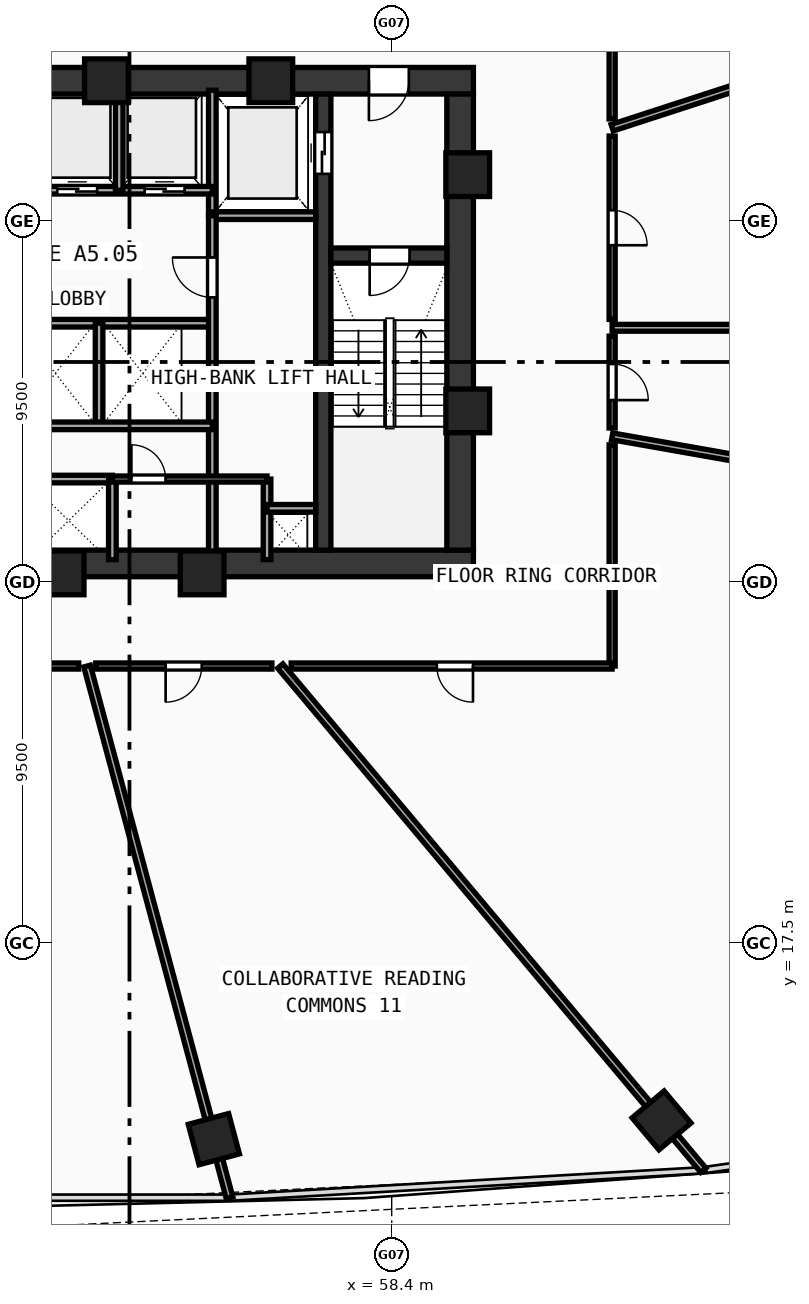
"""IFC4 building model, lengths in metres.
Left out: names, types, materials, properties, quantities, classifications, styles, units other than length and angle.
Written with IfcOpenShell. Run it as: python <this file> out.ifc"""

import sys

from ifc_helpers import new_model, si_unit, direction, frame, frame_2d, origin, origin_with_axes, origin_2d, place, context, subcontext, project, spatial, rectangle, hollow_rectangle, extrude, source, transform, mapped, element, fill, save


model = new_model("IFC4")
c1 = context("Model", 3, precision=1e-05, world=origin(), true_north=direction((0.0, 1.0)))
c2 = subcontext(c1, "Body", "Model", "MODEL_VIEW")
j1 = project(units=[si_unit("LENGTHUNIT", "METRE"), si_unit("PLANEANGLEUNIT", "RADIAN")], contexts=[c1])
p1 = place(None, origin())
s1 = spatial("IfcSite", under=j1, at=p1, CompositionType="ELEMENT")
p2 = place(p1, origin())
s2 = spatial("IfcBuilding", under=s1, at=p2, CompositionType="ELEMENT")
p3 = place(p2, frame((0.0, 0.0, 48.55)))
s3 = spatial("IfcBuildingStorey", under=s2, at=p3, CompositionType="ELEMENT", Elevation=48.55)
p4 = place(p3, frame((35.45, 27.5, 0.0), z_axis=(0.0, 0.0, 1.0), x_axis=(1.0, 0.0, 0.0)))
e1 = element("IfcWall", 1, at=p4, inside=s3, PredefinedType="SHEAR", context=c2, shape_type="SweptSolid", body=[
    extrude(rectangle(XDim=25.1, YDim=0.7, at=frame_2d((12.55, 0.0))), origin(), (0.0, 0.0, 1.0), 3.37),
])
p5 = place(p3, frame((49.2, 40.2, 0.0), z_axis=(0.0, 0.0, 1.0), x_axis=(1.0, 0.0, 0.0)))
e2 = element("IfcWall", 2, at=p5, inside=s3, PredefinedType="SHEAR", context=c2, shape_type="SweptSolid", body=[
    extrude(rectangle(XDim=11.35, YDim=0.7, at=frame_2d((5.675, 0.0))), origin(), (0.0, 0.0, 1.0), 3.37),
])
p6 = place(p5, frame((8.6, 0.0, 0.0)))
e3 = element("IfcOpeningElement", 3, at=p6, cuts=e2, PredefinedType="OPENING", context=c2, shape_type="SweptSolid", body=[
    extrude(rectangle(XDim=1.05, YDim=2.1, at=frame_2d((0.525, 1.05))), frame((0.0, 0.36, 0.0), z_axis=(0.0, -1.0, 0.0), x_axis=(1.0, 0.0, 0.0)), (0.0, 0.0, 1.0), 0.72),
])
p7 = place(p3, frame((60.2, 27.85, 0.0), z_axis=(0.0, 0.0, 1.0), x_axis=(0.0, 1.0, 0.0)))
e4 = element("IfcWall", 4, at=p7, inside=s3, PredefinedType="SHEAR", context=c2, shape_type="SweptSolid", body=[
    extrude(rectangle(XDim=12.0, YDim=0.7, at=frame_2d((6.0, 0.0))), origin(), (0.0, 0.0, 1.0), 3.37),
])
p8 = place(p3, frame((56.6, 27.85, 0.0), z_axis=(0.0, 0.0, 1.0), x_axis=(0.0, 1.0, 0.0)))
e5 = element("IfcWall", 5, at=p8, inside=s3, PredefinedType="SHEAR", context=c2, shape_type="SweptSolid", body=[
    extrude(rectangle(XDim=12.0, YDim=0.4, at=frame_2d((6.0, 0.0))), origin(), (0.0, 0.0, 1.0), 3.37),
])
p9 = place(p8, frame((9.9, 0.0, 0.0)))
e6 = element("IfcOpeningElement", 6, at=p9, cuts=e5, PredefinedType="OPENING", context=c2, shape_type="SweptSolid", body=[
    extrude(rectangle(XDim=1.1, YDim=2.1, at=frame_2d((0.55, 1.05))), frame((0.0, 0.21, 0.0), z_axis=(0.0, -1.0, 0.0), x_axis=(1.0, 0.0, 0.0)), (0.0, 0.0, 1.0), 0.42),
])
p10 = place(p3, frame((56.8, 35.6, 0.0), z_axis=(0.0, 0.0, 1.0), x_axis=(1.0, 0.0, 0.0)))
e7 = element("IfcWall", 7, at=p10, inside=s3, PredefinedType="SHEAR", context=c2, shape_type="SweptSolid", body=[
    extrude(rectangle(XDim=3.05, YDim=0.4, at=frame_2d((1.525, 0.0))), origin(), (0.0, 0.0, 1.0), 3.37),
])
p11 = place(p10, frame((1.02, 0.0, 0.0)))
e8 = element("IfcOpeningElement", 8, at=p11, cuts=e7, PredefinedType="OPENING", context=c2, shape_type="SweptSolid", body=[
    extrude(rectangle(XDim=1.05, YDim=2.1, at=frame_2d((0.525, 1.05))), frame((0.0, 0.21, 0.0), z_axis=(0.0, -1.0, 0.0), x_axis=(1.0, 0.0, 0.0)), (0.0, 0.0, 1.0), 0.42),
])
m1 = source(origin(), c2, "Body", "SweptSolid", [
    extrude(hollow_rectangle(XDim=1.15, YDim=1.15, WallThickness=0.048, at=origin_2d()), origin(), (0.0, 0.0, 1.0), 3.63),
])
for number, where, z_axis, x_axis in (
    (9, (49.729, 27.25, -0.26), (0.0, 0.0, 1.0), (1.0, 0.0, 0.0)),
    (10, (53.412, 27.25, -0.26), (0.0, 0.0, 1.0), (1.0, 0.0, 0.0)),
    (11, (60.4, 31.513, -0.26), (0.0, 0.0, 1.0), (1.0, 0.0, 0.0)),
    (12, (60.4, 37.729, -0.26), (0.0, 0.0, 1.0), (1.0, 0.0, 0.0)),
    (13, (55.219, 40.2, -0.26), (0.0, 0.0, 1.0), (1.0, 0.0, 0.0)),
    (14, (50.894, 40.2, -0.26), (0.0, 0.0, 1.0), (1.0, 0.0, 0.0)),
):
    element("IfcColumn", number, at=place(p3, frame(where, z_axis=z_axis, x_axis=x_axis)), inside=s3, PredefinedType="COLUMN", context=c2, shape_type="MappedRepresentation", body=[
        mapped(m1, transform((0.0, 0.0, 0.0), scale=1.0)),
    ])
m2 = source(origin(), c2, "Body", "SweptSolid", [
    extrude(hollow_rectangle(XDim=1.1, YDim=1.1, WallThickness=0.045, at=origin_2d()), origin(), (0.0, 0.0, 1.0), 3.63),
])
for number, where, z_axis, x_axis in (
    (15, (53.72, 12.352, -0.26), (0.0, 0.0, 1.0), (0.966, 0.259, 0.0)),
    (16, (65.5, 12.844, -0.26), (0.0, 0.0, 1.0), (0.766, 0.643, 0.0)),
):
    element("IfcColumn", number, at=place(p3, frame(where, z_axis=z_axis, x_axis=x_axis)), inside=s3, PredefinedType="COLUMN", context=c2, shape_type="MappedRepresentation", body=[
        mapped(m2, transform((0.0, 0.0, 0.0), scale=1.0)),
    ])
p12 = place(p3, frame((53.68, 36.65, 0.0), z_axis=(0.0, 0.0, 1.0), x_axis=(0.0, 1.0, 0.0)))
e17 = element("IfcWall", 17, at=p12, inside=s3, PredefinedType="SOLIDWALL", context=c2, shape_type="SweptSolid", body=[
    extrude(rectangle(XDim=3.3, YDim=0.2, at=frame_2d((1.65, 0.0))), origin(), (0.0, 0.0, 1.0), 3.37),
])
p13 = place(p3, frame((53.68, 36.65, 0.0), z_axis=(0.0, 0.0, 1.0), x_axis=(1.0, 0.0, 0.0)))
e18 = element("IfcWall", 18, at=p13, inside=s3, PredefinedType="SOLIDWALL", context=c2, shape_type="SweptSolid", body=[
    extrude(rectangle(XDim=2.72, YDim=0.2, at=frame_2d((1.36, 0.0))), origin(), (0.0, 0.0, 1.0), 3.37),
])
p14 = place(p3, frame((48.95, 37.32, 0.0), z_axis=(0.0, 0.0, 1.0), x_axis=(1.0, 0.0, 0.0)))
e19 = element("IfcWall", 19, at=p14, inside=s3, PredefinedType="SOLIDWALL", context=c2, shape_type="SweptSolid", body=[
    extrude(rectangle(XDim=4.73, YDim=0.2, at=frame_2d((2.365, 0.0))), origin(), (0.0, 0.0, 1.0), 3.37),
])
p15 = place(p14, frame((0.65, 0.0, 0.0)))
e20 = element("IfcOpeningElement", 20, at=p15, cuts=e19, PredefinedType="OPENING", context=c2, shape_type="SweptSolid", body=[
    extrude(rectangle(XDim=1.05, YDim=2.1, at=frame_2d((0.525, 1.05))), frame((0.0, 0.11, 0.0), z_axis=(0.0, -1.0, 0.0), x_axis=(1.0, 0.0, 0.0)), (0.0, 0.0, 1.0), 0.22),
])
p16 = place(p14, frame((2.95, 0.0, 0.0)))
e21 = element("IfcOpeningElement", 21, at=p16, cuts=e19, PredefinedType="OPENING", context=c2, shape_type="SweptSolid", body=[
    extrude(rectangle(XDim=1.05, YDim=2.1, at=frame_2d((0.525, 1.05))), frame((0.0, 0.11, 0.0), z_axis=(0.0, -1.0, 0.0), x_axis=(1.0, 0.0, 0.0)), (0.0, 0.0, 1.0), 0.22),
])
p17 = place(p3, frame((51.23, 37.32, 0.0), z_axis=(0.0, 0.0, 1.0), x_axis=(0.0, 1.0, 0.0)))
e22 = element("IfcWall", 22, at=p17, inside=s3, PredefinedType="SOLIDWALL", context=c2, shape_type="SweptSolid", body=[
    extrude(rectangle(XDim=2.63, YDim=0.2, at=frame_2d((1.315, 0.0))), origin(), (0.0, 0.0, 1.0), 3.37),
])
p18 = place(p3, frame((43.85, 33.82, 0.0), z_axis=(0.0, 0.0, 1.0), x_axis=(1.0, 0.0, 0.0)))
e23 = element("IfcWall", 23, at=p18, inside=s3, PredefinedType="SOLIDWALL", context=c2, shape_type="SweptSolid", body=[
    extrude(rectangle(XDim=9.83, YDim=0.2, at=frame_2d((4.915, 0.0))), origin(), (0.0, 0.0, 1.0), 3.37),
])
p19 = place(p3, frame((53.68, 27.6, 0.0), z_axis=(0.0, 0.0, 1.0), x_axis=(0.0, 1.0, 0.0)))
e24 = element("IfcWall", 24, at=p19, inside=s3, PredefinedType="SOLIDWALL", context=c2, shape_type="SweptSolid", body=[
    extrude(rectangle(XDim=9.05, YDim=0.2, at=frame_2d((4.525, 0.0))), origin(), (0.0, 0.0, 1.0), 3.37),
])
p20 = place(p19, frame((6.9, 0.0, 0.0)))
e25 = element("IfcOpeningElement", 25, at=p20, cuts=e24, PredefinedType="OPENING", context=c2, shape_type="SweptSolid", body=[
    extrude(rectangle(XDim=1.05, YDim=2.1, at=frame_2d((0.525, 1.05))), frame((0.0, 0.11, 0.0), z_axis=(0.0, -1.0, 0.0), x_axis=(1.0, 0.0, 0.0)), (0.0, 0.0, 1.0), 0.22),
])
p21 = place(p3, frame((50.7, 31.12, 0.0), z_axis=(0.0, 0.0, 1.0), x_axis=(0.0, 1.0, 0.0)))
e26 = element("IfcWall", 26, at=p21, inside=s3, PredefinedType="SOLIDWALL", context=c2, shape_type="SweptSolid", body=[
    extrude(rectangle(XDim=2.7, YDim=0.2, at=frame_2d((1.35, 0.0))), origin(), (0.0, 0.0, 1.0), 3.37),
])
p22 = place(p3, frame((43.85, 29.72, 0.0), z_axis=(0.0, 0.0, 1.0), x_axis=(1.0, 0.0, 0.0)))
e27 = element("IfcWall", 27, at=p22, inside=s3, PredefinedType="SOLIDWALL", context=c2, shape_type="SweptSolid", body=[
    extrude(rectangle(XDim=7.2, YDim=0.2, at=frame_2d((3.6, 0.0))), origin(), (0.0, 0.0, 1.0), 3.37),
])
p23 = place(p3, frame((51.05, 27.6, 0.0), z_axis=(0.0, 0.0, 1.0), x_axis=(0.0, 1.0, 0.0)))
e28 = element("IfcWall", 28, at=p23, inside=s3, PredefinedType="SOLIDWALL", context=c2, shape_type="SweptSolid", body=[
    extrude(rectangle(XDim=2.12, YDim=0.2, at=frame_2d((1.06, 0.0))), origin(), (0.0, 0.0, 1.0), 3.37),
])
p24 = place(p3, frame((43.85, 31.12, 0.0), z_axis=(0.0, 0.0, 1.0), x_axis=(1.0, 0.0, 0.0)))
e29 = element("IfcWall", 29, at=p24, inside=s3, PredefinedType="SOLIDWALL", context=c2, shape_type="SweptSolid", body=[
    extrude(rectangle(XDim=9.83, YDim=0.2, at=frame_2d((4.915, 0.0))), origin(), (0.0, 0.0, 1.0), 3.37),
])
p25 = place(p3, frame((55.12, 27.6, 0.0), z_axis=(0.0, 0.0, 1.0), x_axis=(0.0, 1.0, 0.0)))
e30 = element("IfcWall", 30, at=p25, inside=s3, PredefinedType="SOLIDWALL", context=c2, shape_type="SweptSolid", body=[
    extrude(rectangle(XDim=2.12, YDim=0.2, at=frame_2d((1.06, 0.0))), origin(), (0.0, 0.0, 1.0), 3.37),
])
p26 = place(p3, frame((55.12, 28.95, 0.0), z_axis=(0.0, 0.0, 1.0), x_axis=(1.0, 0.0, 0.0)))
e31 = element("IfcWall", 31, at=p26, inside=s3, PredefinedType="SOLIDWALL", context=c2, shape_type="SweptSolid", body=[
    extrude(rectangle(XDim=1.28, YDim=0.2, at=frame_2d((0.64, 0.0))), origin(), (0.0, 0.0, 1.0), 3.37),
])
p27 = place(p3, frame((51.05, 29.72, 0.0), z_axis=(0.0, 0.0, 1.0), x_axis=(1.0, 0.0, 0.0)))
e32 = element("IfcWall", 32, at=p27, inside=s3, PredefinedType="PARTITIONING", context=c2, shape_type="SweptSolid", body=[
    extrude(rectangle(XDim=4.07, YDim=0.16, at=frame_2d((2.035, 0.0))), origin(), (0.0, 0.0, 1.0), 3.37),
])
p28 = place(p27, frame((0.5, 0.0, 0.0)))
e33 = element("IfcOpeningElement", 33, at=p28, cuts=e32, PredefinedType="OPENING", context=c2, shape_type="SweptSolid", body=[
    extrude(rectangle(XDim=0.9, YDim=2.1, at=frame_2d((0.45, 1.05))), frame((0.0, 0.09, 0.0), z_axis=(0.0, -1.0, 0.0), x_axis=(1.0, 0.0, 0.0)), (0.0, 0.0, 1.0), 0.18),
])
p29 = place(p3, frame((64.2, 33.7, 0.0), z_axis=(0.0, 0.0, 1.0), x_axis=(1.0, 0.0, 0.0)))
e34 = element("IfcWall", 34, at=p29, inside=s3, PredefinedType="PARTITIONING", context=c2, shape_type="SweptSolid", body=[
    extrude(rectangle(XDim=22.398, YDim=0.18, at=frame_2d((11.199, 0.0))), origin(), (0.0, 0.0, 1.0), 2.67),
])
p30 = place(p3, frame((64.2, 38.964, 0.0), z_axis=(0.0, 0.0, 1.0), x_axis=(0.951055212532, 0.309021006915, 0.0)))
e35 = element("IfcWall", 35, at=p30, inside=s3, PredefinedType="PARTITIONING", context=c2, shape_type="SweptSolid", body=[
    extrude(rectangle(XDim=18.581, YDim=0.18, at=frame_2d((9.291, 0.0))), origin(), (0.0, 0.0, 1.0), 2.67),
])
p31 = place(p3, frame((50.385, 24.8, 0.0), z_axis=(0.0, 0.0, 1.0), x_axis=(0.258819787056, -0.965925627483, 0.0)))
e36 = element("IfcWall", 36, at=p31, inside=s3, PredefinedType="PARTITIONING", context=c2, shape_type="SweptSolid", body=[
    extrude(rectangle(XDim=14.482, YDim=0.18, at=frame_2d((7.241, 0.0))), origin(), (0.0, 0.0, 1.0), 2.67),
])
p32 = place(p3, frame((55.468, 24.8, 0.0), z_axis=(0.0, 0.0, 1.0), x_axis=(0.642784696521, -0.766046887546, 0.0)))
e37 = element("IfcWall", 37, at=p32, inside=s3, PredefinedType="PARTITIONING", context=c2, shape_type="SweptSolid", body=[
    extrude(rectangle(XDim=17.319, YDim=0.18, at=frame_2d((8.659, 0.0))), origin(), (0.0, 0.0, 1.0), 2.67),
])
p33 = place(p3, frame((64.2, 30.844, 0.0), z_axis=(0.0, 0.0, 1.0), x_axis=(0.984807792045, -0.173647956302, 0.0)))
e38 = element("IfcWall", 38, at=p33, inside=s3, PredefinedType="PARTITIONING", context=c2, shape_type="SweptSolid", body=[
    extrude(rectangle(XDim=25.954, YDim=0.18, at=frame_2d((12.977, 0.0))), origin(), (0.0, 0.0, 1.0), 2.67),
])
p34 = place(p3, frame((64.2, 48.067, 0.0), z_axis=(0.0, 0.0, 1.0), x_axis=(0.0, -1.0, 0.0)))
e39 = element("IfcWall", 39, at=p34, inside=s3, PredefinedType="PARTITIONING", context=c2, shape_type="SweptSolid", body=[
    extrude(rectangle(XDim=8.872, YDim=0.16, at=frame_2d((4.436, 0.0))), origin(), (0.0, 0.0, 1.0), 2.67),
])
p35 = place(p34, frame((3.967, 0.0, 0.0)))
e40 = element("IfcOpeningElement", 40, at=p35, cuts=e39, PredefinedType="OPENING", context=c2, shape_type="SweptSolid", body=[
    extrude(rectangle(XDim=0.95, YDim=2.1, at=frame_2d((0.475, 1.05))), frame((0.0, 0.09, 0.0), z_axis=(0.0, -1.0, 0.0), x_axis=(1.0, 0.0, 0.0)), (0.0, 0.0, 1.0), 0.18),
])
p36 = place(p3, frame((64.2, 38.744, 0.0), z_axis=(0.0, 0.0, 1.0), x_axis=(0.0, -1.0, 0.0)))
e41 = element("IfcWall", 41, at=p36, inside=s3, PredefinedType="PARTITIONING", context=c2, shape_type="SweptSolid", body=[
    extrude(rectangle(XDim=4.824, YDim=0.16, at=frame_2d((2.412, 0.0))), origin(), (0.0, 0.0, 1.0), 3.37),
])
p37 = place(p36, frame((1.952, 0.0, 0.0)))
e42 = element("IfcOpeningElement", 42, at=p37, cuts=e41, PredefinedType="OPENING", context=c2, shape_type="SweptSolid", body=[
    extrude(rectangle(XDim=0.92, YDim=2.1, at=frame_2d((0.46, 1.05))), frame((0.0, 0.09, 0.0), z_axis=(0.0, -1.0, 0.0), x_axis=(1.0, 0.0, 0.0)), (0.0, 0.0, 1.0), 0.18),
])
p38 = place(p3, frame((64.2, 33.48, 0.0), z_axis=(0.0, 0.0, 1.0), x_axis=(0.0, -1.0, 0.0)))
e43 = element("IfcWall", 43, at=p38, inside=s3, PredefinedType="PARTITIONING", context=c2, shape_type="SweptSolid", body=[
    extrude(rectangle(XDim=2.417, YDim=0.16, at=frame_2d((1.208, 0.0))), origin(), (0.0, 0.0, 1.0), 3.37),
])
p39 = place(p38, frame((0.733, 0.0, 0.0)))
e44 = element("IfcOpeningElement", 44, at=p39, cuts=e43, PredefinedType="OPENING", context=c2, shape_type="SweptSolid", body=[
    extrude(rectangle(XDim=0.95, YDim=2.1, at=frame_2d((0.475, 1.05))), frame((0.0, 0.09, 0.0), z_axis=(0.0, -1.0, 0.0), x_axis=(1.0, 0.0, 0.0)), (0.0, 0.0, 1.0), 0.18),
])
p40 = place(p3, frame((64.2, 30.62, 0.0), z_axis=(0.0, 0.0, 1.0), x_axis=(0.0, -1.0, 0.0)))
e45 = element("IfcWall", 45, at=p40, inside=s3, PredefinedType="PARTITIONING", context=c2, shape_type="SweptSolid", body=[
    extrude(rectangle(XDim=5.82, YDim=0.16, at=frame_2d((2.91, 0.0))), origin(), (0.0, 0.0, 1.0), 2.97),
])
p41 = place(p3, frame((64.2, 24.8, 0.0), z_axis=(0.0, 0.0, 1.0), x_axis=(-1.0, 0.0, 0.0)))
e46 = element("IfcWall", 46, at=p41, inside=s3, PredefinedType="PARTITIONING", context=c2, shape_type="SweptSolid", body=[
    extrude(rectangle(XDim=8.445, YDim=0.16, at=frame_2d((4.222, 0.0))), origin(), (0.0, 0.0, 1.0), 2.97),
])
p42 = place(p41, frame((3.661, 0.0, 0.0)))
e47 = element("IfcOpeningElement", 47, at=p42, cuts=e46, PredefinedType="OPENING", context=c2, shape_type="SweptSolid", body=[
    extrude(rectangle(XDim=0.95, YDim=2.1, at=frame_2d((0.475, 1.05))), frame((0.0, 0.09, 0.0), z_axis=(0.0, -1.0, 0.0), x_axis=(1.0, 0.0, 0.0)), (0.0, 0.0, 1.0), 0.18),
])
p43 = place(p3, frame((55.248, 24.8, 0.0), z_axis=(0.0, 0.0, 1.0), x_axis=(-1.0, 0.0, 0.0)))
e48 = element("IfcWall", 48, at=p43, inside=s3, PredefinedType="PARTITIONING", context=c2, shape_type="SweptSolid", body=[
    extrude(rectangle(XDim=4.635, YDim=0.16, at=frame_2d((2.318, 0.0))), origin(), (0.0, 0.0, 1.0), 2.67),
])
p44 = place(p43, frame((1.847, 0.0, 0.0)))
e49 = element("IfcOpeningElement", 49, at=p44, cuts=e48, PredefinedType="OPENING", context=c2, shape_type="SweptSolid", body=[
    extrude(rectangle(XDim=0.95, YDim=2.1, at=frame_2d((0.475, 1.05))), frame((0.0, 0.09, 0.0), z_axis=(0.0, -1.0, 0.0), x_axis=(1.0, 0.0, 0.0)), (0.0, 0.0, 1.0), 0.18),
])
p45 = place(p3, frame((50.165, 24.8, 0.0), z_axis=(0.0, 0.0, 1.0), x_axis=(-1.0, 0.0, 0.0)))
e50 = element("IfcWall", 50, at=p45, inside=s3, PredefinedType="PARTITIONING", context=c2, shape_type="SweptSolid", body=[
    extrude(rectangle(XDim=7.948, YDim=0.16, at=frame_2d((3.974, 0.0))), origin(), (0.0, 0.0, 1.0), 2.67),
])
p46 = place(p45, frame((3.499, 0.0, 0.0)))
e51 = element("IfcOpeningElement", 51, at=p46, cuts=e50, PredefinedType="OPENING", context=c2, shape_type="SweptSolid", body=[
    extrude(rectangle(XDim=0.95, YDim=2.1, at=frame_2d((0.475, 1.05))), frame((0.0, 0.09, 0.0), z_axis=(0.0, -1.0, 0.0), x_axis=(1.0, 0.0, 0.0)), (0.0, 0.0, 1.0), 0.18),
])
m3 = source(origin(), c2, "Body", "SweptSolid", [
    extrude(rectangle(XDim=1.05, YDim=2.1, at=frame_2d((0.525, 1.05))), frame((0.0, 0.025, 0.0), z_axis=(0.0, -1.0, 0.0), x_axis=(1.0, 0.0, 0.0)), (0.0, 0.0, 1.0), 0.05),
])
p47 = place(p11, frame((1.05, 0.0, 0.0), z_axis=(0.0, 0.0, 1.0), x_axis=(-1.0, 0.0, 0.0)))
e52 = element("IfcDoor", 52, at=p47, inside=s3, OperationType="SINGLE_SWING_RIGHT", PredefinedType="DOOR", context=c2, shape_type="MappedRepresentation", body=[
    mapped(m3, transform((0.0, 0.0, 0.0), scale=1.0)),
])
fill(e8, e52)
p48 = place(p6, frame((1.05, 0.0, 0.0), z_axis=(0.0, 0.0, 1.0), x_axis=(-1.0, 0.0, 0.0)))
e53 = element("IfcDoor", 53, at=p48, inside=s3, OperationType="SINGLE_SWING_RIGHT", PredefinedType="DOOR", context=c2, shape_type="MappedRepresentation", body=[
    mapped(m3, transform((0.0, 0.0, 0.0), scale=1.0)),
])
fill(e3, e53)
m4 = source(origin(), c2, "Body", "SweptSolid", [
    extrude(rectangle(XDim=1.1, YDim=2.1, at=frame_2d((0.55, 1.05))), frame((0.0, 0.025, 0.0), z_axis=(0.0, -1.0, 0.0), x_axis=(1.0, 0.0, 0.0)), (0.0, 0.0, 1.0), 0.05),
])
p49 = place(p9, origin_with_axes())
e54 = element("IfcDoor", 54, at=p49, inside=s3, OperationType="DOUBLE_DOOR_SLIDING", PredefinedType="DOOR", context=c2, shape_type="MappedRepresentation", body=[
    mapped(m4, transform((0.0, 0.0, 0.0), scale=1.0)),
])
fill(e6, e54)
p50 = place(p15, frame((1.05, 0.0, 0.0), z_axis=(0.0, 0.0, 1.0), x_axis=(-1.0, 0.0, 0.0)))
e55 = element("IfcDoor", 55, at=p50, inside=s3, OperationType="DOUBLE_DOOR_SLIDING", PredefinedType="DOOR", context=c2, shape_type="MappedRepresentation", body=[
    mapped(m3, transform((0.0, 0.0, 0.0), scale=1.0)),
])
fill(e20, e55)
p51 = place(p16, frame((1.05, 0.0, 0.0), z_axis=(0.0, 0.0, 1.0), x_axis=(-1.0, 0.0, 0.0)))
e56 = element("IfcDoor", 56, at=p51, inside=s3, OperationType="DOUBLE_DOOR_SLIDING", PredefinedType="DOOR", context=c2, shape_type="MappedRepresentation", body=[
    mapped(m3, transform((0.0, 0.0, 0.0), scale=1.0)),
])
fill(e21, e56)
p52 = place(p20, origin_with_axes())
e57 = element("IfcDoor", 57, at=p52, inside=s3, OperationType="SINGLE_SWING_RIGHT", PredefinedType="DOOR", context=c2, shape_type="MappedRepresentation", body=[
    mapped(m3, transform((0.0, 0.0, 0.0), scale=1.0)),
])
fill(e25, e57)
m5 = source(origin(), c2, "Body", "SweptSolid", [
    extrude(rectangle(XDim=0.9, YDim=2.1, at=frame_2d((0.45, 1.05))), frame((0.0, 0.025, 0.0), z_axis=(0.0, -1.0, 0.0), x_axis=(1.0, 0.0, 0.0)), (0.0, 0.0, 1.0), 0.05),
])
p53 = place(p28, origin_with_axes())
e58 = element("IfcDoor", 58, at=p53, inside=s3, OperationType="SINGLE_SWING_LEFT", PredefinedType="DOOR", context=c2, shape_type="MappedRepresentation", body=[
    mapped(m5, transform((0.0, 0.0, 0.0), scale=1.0)),
])
fill(e33, e58)
m6 = source(origin(), c2, "Body", "SweptSolid", [
    extrude(rectangle(XDim=0.92, YDim=2.1, at=frame_2d((0.46, 1.05))), frame((0.0, 0.025, 0.0), z_axis=(0.0, -1.0, 0.0), x_axis=(1.0, 0.0, 0.0)), (0.0, 0.0, 1.0), 0.05),
])
p54 = place(p37, origin_with_axes())
e59 = element("IfcDoor", 59, at=p54, inside=s3, OperationType="SINGLE_SWING_RIGHT", PredefinedType="DOOR", context=c2, shape_type="MappedRepresentation", body=[
    mapped(m6, transform((0.0, 0.0, 0.0), scale=1.0)),
])
fill(e42, e59)
m7 = source(origin(), c2, "Body", "SweptSolid", [
    extrude(rectangle(XDim=0.95, YDim=2.1, at=frame_2d((0.475, 1.05))), frame((0.0, 0.025, 0.0), z_axis=(0.0, -1.0, 0.0), x_axis=(1.0, 0.0, 0.0)), (0.0, 0.0, 1.0), 0.05),
])
p55 = place(p44, origin_with_axes())
e60 = element("IfcDoor", 60, at=p55, inside=s3, OperationType="SINGLE_SWING_RIGHT", PredefinedType="DOOR", context=c2, shape_type="MappedRepresentation", body=[
    mapped(m7, transform((0.0, 0.0, 0.0), scale=1.0)),
])
fill(e49, e60)
p56 = place(p42, origin_with_axes())
e61 = element("IfcDoor", 61, at=p56, inside=s3, OperationType="SINGLE_SWING_LEFT", PredefinedType="DOOR", context=c2, shape_type="MappedRepresentation", body=[
    mapped(m7, transform((0.0, 0.0, 0.0), scale=1.0)),
])
fill(e47, e61)
p57 = place(p39, origin_with_axes())
e62 = element("IfcDoor", 62, at=p57, inside=s3, OperationType="SINGLE_SWING_RIGHT", PredefinedType="DOOR", context=c2, shape_type="MappedRepresentation", body=[
    mapped(m7, transform((0.0, 0.0, 0.0), scale=1.0)),
])
fill(e44, e62)
save(model, sys.argv[1])
